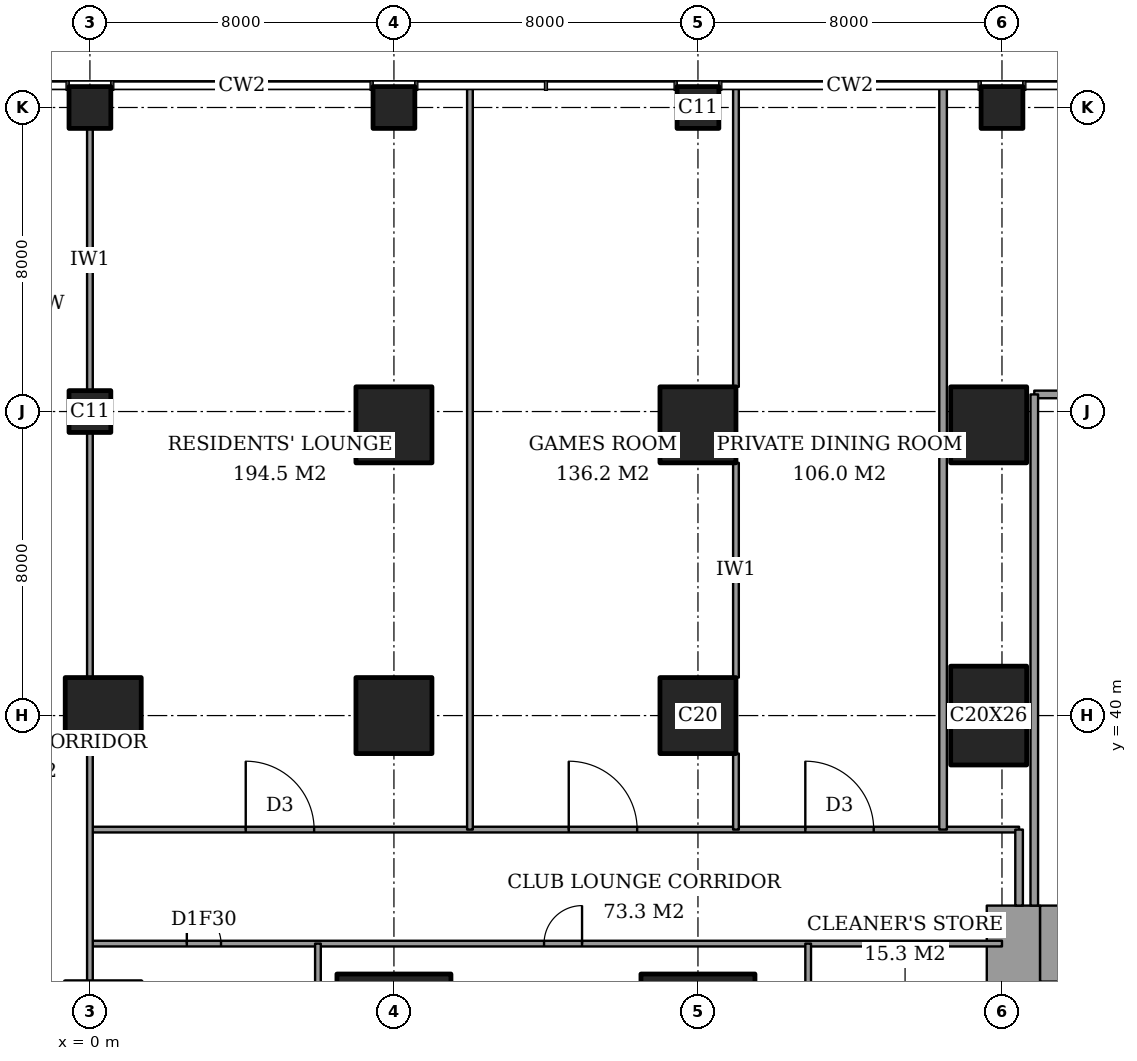
"""IFC4 building model, lengths in metres.
Left out: names, types, materials, properties, quantities, classifications, styles, units other than length and angle.
Written with IfcOpenShell. Run it as: python <this file> out.ifc"""

import sys

from ifc_helpers import new_model, si_unit, direction, frame, frame_2d, origin, origin_2d, place, context, subcontext, project, spatial, rectangle, extrude, element, fill, save


model = new_model("IFC4")
c1 = context("Model", 3, precision=1e-05, world=origin(), true_north=direction((0.0, 1.0)))
c2 = subcontext(c1, "Body", "Model", "MODEL_VIEW")
j1 = project(units=[si_unit("LENGTHUNIT", "METRE"), si_unit("PLANEANGLEUNIT", "RADIAN")], contexts=[c1])
p1 = place(None, origin())
s1 = spatial("IfcSite", under=j1, at=p1, CompositionType="ELEMENT")
p2 = place(p1, origin())
s2 = spatial("IfcBuilding", under=s1, at=p2, CompositionType="ELEMENT")
p3 = place(p2, frame((0.0, 0.0, 6.0)))
s3 = spatial("IfcBuildingStorey", under=s2, at=p3, CompositionType="ELEMENT", Elevation=6.0)
p4 = place(p3, frame((0.35, 40.0, 0.0), z_axis=(0.0, 0.0, 1.0), x_axis=(1.0, 0.0, 0.0)))
e1 = element("IfcColumn", 1, at=p4, inside=s3, PredefinedType="COLUMN", context=c2, shape_type="SweptSolid", body=[
    extrude(rectangle(XDim=2.0, YDim=2.0, at=origin_2d()), origin(), (0.0, 0.0, 1.0), 5.0),
])
for number, where, z_axis, x_axis in (
    (2, (0.0, 48.0, 0.0), (0.0, 0.0, 1.0), (1.0, 0.0, 0.0)),
    (3, (0.0, 56.0, 0.0), (0.0, 0.0, 1.0), (1.0, 0.0, 0.0)),
):
    element("IfcColumn", number, at=place(p3, frame(where, z_axis=z_axis, x_axis=x_axis)), inside=s3, PredefinedType="COLUMN", context=c2, shape_type="SweptSolid", body=[
        extrude(rectangle(XDim=1.1, YDim=1.1, at=origin_2d()), origin(), (0.0, 0.0, 1.0), 5.0),
    ])
p5 = place(p3, frame((8.0, 32.0, 0.0), z_axis=(0.0, 0.0, 1.0), x_axis=(1.0, 0.0, 0.0)))
e4 = element("IfcColumn", 4, at=p5, inside=s3, PredefinedType="COLUMN", context=c2, shape_type="SweptSolid", body=[
    extrude(rectangle(XDim=3.0, YDim=2.4, at=origin_2d()), origin(), (0.0, 0.0, 1.0), 5.0),
])
for number, where, z_axis, x_axis in (
    (5, (8.0, 40.0, 0.0), (0.0, 0.0, 1.0), (1.0, 0.0, 0.0)),
    (6, (8.0, 47.65, 0.0), (0.0, 0.0, 1.0), (1.0, 0.0, 0.0)),
):
    element("IfcColumn", number, at=place(p3, frame(where, z_axis=z_axis, x_axis=x_axis)), inside=s3, PredefinedType="COLUMN", context=c2, shape_type="SweptSolid", body=[
        extrude(rectangle(XDim=2.0, YDim=2.0, at=origin_2d()), origin(), (0.0, 0.0, 1.0), 5.0),
    ])
p6 = place(p3, frame((8.0, 56.0, 0.0), z_axis=(0.0, 0.0, 1.0), x_axis=(1.0, 0.0, 0.0)))
e7 = element("IfcColumn", 7, at=p6, inside=s3, PredefinedType="COLUMN", context=c2, shape_type="SweptSolid", body=[
    extrude(rectangle(XDim=1.1, YDim=1.1, at=origin_2d()), origin(), (0.0, 0.0, 1.0), 5.0),
])
p7 = place(p3, frame((16.0, 32.0, 0.0), z_axis=(0.0, 0.0, 1.0), x_axis=(1.0, 0.0, 0.0)))
e8 = element("IfcColumn", 8, at=p7, inside=s3, PredefinedType="COLUMN", context=c2, shape_type="SweptSolid", body=[
    extrude(rectangle(XDim=3.0, YDim=2.4, at=origin_2d()), origin(), (0.0, 0.0, 1.0), 5.0),
])
for number, where, z_axis, x_axis in (
    (9, (16.0, 40.0, 0.0), (0.0, 0.0, 1.0), (1.0, 0.0, 0.0)),
    (10, (16.0, 47.65, 0.0), (0.0, 0.0, 1.0), (1.0, 0.0, 0.0)),
):
    element("IfcColumn", number, at=place(p3, frame(where, z_axis=z_axis, x_axis=x_axis)), inside=s3, PredefinedType="COLUMN", context=c2, shape_type="SweptSolid", body=[
        extrude(rectangle(XDim=2.0, YDim=2.0, at=origin_2d()), origin(), (0.0, 0.0, 1.0), 5.0),
    ])
p8 = place(p3, frame((16.0, 56.0, 0.0), z_axis=(0.0, 0.0, 1.0), x_axis=(1.0, 0.0, 0.0)))
e11 = element("IfcColumn", 11, at=p8, inside=s3, PredefinedType="COLUMN", context=c2, shape_type="SweptSolid", body=[
    extrude(rectangle(XDim=1.1, YDim=1.1, at=origin_2d()), origin(), (0.0, 0.0, 1.0), 5.0),
])
p9 = place(p3, frame((23.65, 40.0, 0.0), z_axis=(0.0, 0.0, 1.0), x_axis=(1.0, 0.0, 0.0)))
e12 = element("IfcColumn", 12, at=p9, inside=s3, PredefinedType="COLUMN", context=c2, shape_type="SweptSolid", body=[
    extrude(rectangle(XDim=2.0, YDim=2.6, at=origin_2d()), origin(), (0.0, 0.0, 1.0), 5.0),
])
p10 = place(p3, frame((23.65, 47.65, 0.0), z_axis=(0.0, 0.0, 1.0), x_axis=(1.0, 0.0, 0.0)))
e13 = element("IfcColumn", 13, at=p10, inside=s3, PredefinedType="COLUMN", context=c2, shape_type="SweptSolid", body=[
    extrude(rectangle(XDim=2.0, YDim=2.0, at=origin_2d()), origin(), (0.0, 0.0, 1.0), 5.0),
])
p11 = place(p3, frame((24.0, 56.0, 0.0), z_axis=(0.0, 0.0, 1.0), x_axis=(1.0, 0.0, 0.0)))
e14 = element("IfcColumn", 14, at=p11, inside=s3, PredefinedType="COLUMN", context=c2, shape_type="SweptSolid", body=[
    extrude(rectangle(XDim=1.1, YDim=1.1, at=origin_2d()), origin(), (0.0, 0.0, 1.0), 5.0),
])
p12 = place(p3, frame((25.0, 34.0, 0.0), z_axis=(0.0, 0.0, 1.0), x_axis=(1.0, 0.0, 0.0)))
e15 = element("IfcWall", 15, at=p12, inside=s3, PredefinedType="SHEAR", context=c2, shape_type="SweptSolid", body=[
    extrude(rectangle(XDim=3.15, YDim=2.0, at=frame_2d((1.575, 0.0))), origin(), (0.0, 0.0, 1.0), 5.0),
])
p13 = place(p3, frame((24.3, 23.15, 0.0), z_axis=(0.0, 0.0, 1.0), x_axis=(0.0, 1.0, 0.0)))
e16 = element("IfcWall", 16, at=p13, inside=s3, PredefinedType="SHEAR", context=c2, shape_type="SweptSolid", body=[
    extrude(rectangle(XDim=11.85, YDim=1.4, at=frame_2d((5.925, 0.0))), origin(), (0.0, 0.0, 1.0), 5.0),
])
p14 = place(p13, frame((0.75, 0.0, 0.0)))
e17 = element("IfcOpeningElement", 17, at=p14, cuts=e16, PredefinedType="OPENING", context=c2, shape_type="SweptSolid", body=[
    extrude(rectangle(XDim=1.8, YDim=2.4, at=frame_2d((0.9, 1.2))), frame((0.0, 0.71, 0.0), z_axis=(0.0, -1.0, 0.0), x_axis=(1.0, 0.0, 0.0)), (0.0, 0.0, 1.0), 1.42),
])
p15 = place(p3, frame((0.0, 34.0, 0.0), z_axis=(0.0, 0.0, 1.0), x_axis=(1.0, 0.0, 0.0)))
e18 = element("IfcWall", 18, at=p15, inside=s3, PredefinedType="PARTITIONING", context=c2, shape_type="SweptSolid", body=[
    extrude(rectangle(XDim=24.0, YDim=0.15, at=frame_2d((12.0, 0.0))), origin(), (0.0, 0.0, 1.0), 4.7),
])
p16 = place(p15, frame((11.95, 0.0, 0.0)))
e19 = element("IfcOpeningElement", 19, at=p16, cuts=e18, PredefinedType="OPENING", context=c2, shape_type="SweptSolid", body=[
    extrude(rectangle(XDim=1.0, YDim=2.1, at=frame_2d((0.5, 1.05))), frame((0.0, 0.085, 0.0), z_axis=(0.0, -1.0, 0.0), x_axis=(1.0, 0.0, 0.0)), (0.0, 0.0, 1.0), 0.17),
])
p17 = place(p15, frame((2.55, 0.0, 0.0)))
e20 = element("IfcOpeningElement", 20, at=p17, cuts=e18, PredefinedType="OPENING", context=c2, shape_type="SweptSolid", body=[
    extrude(rectangle(XDim=0.9, YDim=2.1, at=frame_2d((0.45, 1.05))), frame((0.0, 0.085, 0.0), z_axis=(0.0, -1.0, 0.0), x_axis=(1.0, 0.0, 0.0)), (0.0, 0.0, 1.0), 0.17),
])
p18 = place(p3, frame((0.0, 37.0, 0.0), z_axis=(0.0, 0.0, 1.0), x_axis=(1.0, 0.0, 0.0)))
e21 = element("IfcWall", 21, at=p18, inside=s3, PredefinedType="PARTITIONING", context=c2, shape_type="SweptSolid", body=[
    extrude(rectangle(XDim=24.45, YDim=0.15, at=frame_2d((12.225, 0.0))), origin(), (0.0, 0.0, 1.0), 4.7),
])
p19 = place(p18, frame((4.1, 0.0, 0.0)))
e22 = element("IfcOpeningElement", 22, at=p19, cuts=e21, PredefinedType="OPENING", context=c2, shape_type="SweptSolid", body=[
    extrude(rectangle(XDim=1.8, YDim=2.1, at=frame_2d((0.9, 1.05))), frame((0.0, 0.085, 0.0), z_axis=(0.0, -1.0, 0.0), x_axis=(1.0, 0.0, 0.0)), (0.0, 0.0, 1.0), 0.17),
])
p20 = place(p18, frame((12.6, 0.0, 0.0)))
e23 = element("IfcOpeningElement", 23, at=p20, cuts=e21, PredefinedType="OPENING", context=c2, shape_type="SweptSolid", body=[
    extrude(rectangle(XDim=1.8, YDim=2.1, at=frame_2d((0.9, 1.05))), frame((0.0, 0.085, 0.0), z_axis=(0.0, -1.0, 0.0), x_axis=(1.0, 0.0, 0.0)), (0.0, 0.0, 1.0), 0.17),
])
p21 = place(p18, frame((18.825, 0.0, 0.0)))
e24 = element("IfcOpeningElement", 24, at=p21, cuts=e21, PredefinedType="OPENING", context=c2, shape_type="SweptSolid", body=[
    extrude(rectangle(XDim=1.8, YDim=2.1, at=frame_2d((0.9, 1.05))), frame((0.0, 0.085, 0.0), z_axis=(0.0, -1.0, 0.0), x_axis=(1.0, 0.0, 0.0)), (0.0, 0.0, 1.0), 0.17),
])
p22 = place(p3, frame((24.85, 48.45, 0.0), z_axis=(0.0, 0.0, 1.0), x_axis=(1.0, 0.0, 0.0)))
e25 = element("IfcWall", 25, at=p22, inside=s3, PredefinedType="PARTITIONING", context=c2, shape_type="SweptSolid", body=[
    extrude(rectangle(XDim=7.6, YDim=0.2, at=frame_2d((3.8, 0.0))), origin(), (0.0, 0.0, 1.0), 4.7),
])
p23 = place(p3, frame((0.0, 33.0, 0.0), z_axis=(0.0, 0.0, 1.0), x_axis=(0.0, 1.0, 0.0)))
e26 = element("IfcWall", 26, at=p23, inside=s3, PredefinedType="PARTITIONING", context=c2, shape_type="SweptSolid", body=[
    extrude(rectangle(XDim=6.0, YDim=0.15, at=frame_2d((3.0, 0.0))), origin(), (0.0, 0.0, 1.0), 3.3),
])
p24 = place(p3, frame((0.0, 41.0, 0.0), z_axis=(0.0, 0.0, 1.0), x_axis=(0.0, 1.0, 0.0)))
e27 = element("IfcWall", 27, at=p24, inside=s3, PredefinedType="PARTITIONING", context=c2, shape_type="SweptSolid", body=[
    extrude(rectangle(XDim=6.45, YDim=0.15, at=frame_2d((3.225, 0.0))), origin(), (0.0, 0.0, 1.0), 3.3),
])
p25 = place(p3, frame((0.0, 48.55, 0.0), z_axis=(0.0, 0.0, 1.0), x_axis=(0.0, 1.0, 0.0)))
e28 = element("IfcWall", 28, at=p25, inside=s3, PredefinedType="PARTITIONING", context=c2, shape_type="SweptSolid", body=[
    extrude(rectangle(XDim=6.9, YDim=0.15, at=frame_2d((3.45, 0.0))), origin(), (0.0, 0.0, 1.0), 3.3),
])
p26 = place(p3, frame((6.0, 30.0, 0.0), z_axis=(0.0, 0.0, 1.0), x_axis=(0.0, 1.0, 0.0)))
e29 = element("IfcWall", 29, at=p26, inside=s3, PredefinedType="PARTITIONING", context=c2, shape_type="SweptSolid", body=[
    extrude(rectangle(XDim=4.0, YDim=0.15, at=frame_2d((2.0, 0.0))), origin(), (0.0, 0.0, 1.0), 4.7),
])
p27 = place(p3, frame((10.0, 37.0, 0.0), z_axis=(0.0, 0.0, 1.0), x_axis=(0.0, 1.0, 0.0)))
e30 = element("IfcWall", 30, at=p27, inside=s3, PredefinedType="PARTITIONING", context=c2, shape_type="SweptSolid", body=[
    extrude(rectangle(XDim=19.561, YDim=0.15, at=frame_2d((9.781, 0.0))), origin(), (0.0, 0.0, 1.0), 4.7),
])
p28 = place(p3, frame((17.0, 37.0, 0.0), z_axis=(0.0, 0.0, 1.0), x_axis=(0.0, 1.0, 0.0)))
e31 = element("IfcWall", 31, at=p28, inside=s3, PredefinedType="PARTITIONING", context=c2, shape_type="SweptSolid", body=[
    extrude(rectangle(XDim=2.0, YDim=0.15, at=frame_2d((1.0, 0.0))), origin(), (0.0, 0.0, 1.0), 4.7),
])
p29 = place(p3, frame((17.0, 41.0, 0.0), z_axis=(0.0, 0.0, 1.0), x_axis=(0.0, 1.0, 0.0)))
e32 = element("IfcWall", 32, at=p29, inside=s3, PredefinedType="PARTITIONING", context=c2, shape_type="SweptSolid", body=[
    extrude(rectangle(XDim=5.65, YDim=0.15, at=frame_2d((2.825, 0.0))), origin(), (0.0, 0.0, 1.0), 4.7),
])
p30 = place(p3, frame((17.0, 48.65, 0.0), z_axis=(0.0, 0.0, 1.0), x_axis=(0.0, 1.0, 0.0)))
e33 = element("IfcWall", 33, at=p30, inside=s3, PredefinedType="PARTITIONING", context=c2, shape_type="SweptSolid", body=[
    extrude(rectangle(XDim=7.911, YDim=0.15, at=frame_2d((3.956, 0.0))), origin(), (0.0, 0.0, 1.0), 4.7),
])
p31 = place(p3, frame((18.9, 31.0, 0.0), z_axis=(0.0, 0.0, 1.0), x_axis=(0.0, 1.0, 0.0)))
e34 = element("IfcWall", 34, at=p31, inside=s3, PredefinedType="PARTITIONING", context=c2, shape_type="SweptSolid", body=[
    extrude(rectangle(XDim=3.0, YDim=0.15, at=frame_2d((1.5, 0.0))), origin(), (0.0, 0.0, 1.0), 4.7),
])
p32 = place(p31, frame((1.05, 0.0, 0.0)))
e35 = element("IfcOpeningElement", 35, at=p32, cuts=e34, PredefinedType="OPENING", context=c2, shape_type="SweptSolid", body=[
    extrude(rectangle(XDim=0.9, YDim=2.1, at=frame_2d((0.45, 1.05))), frame((0.0, 0.085, 0.0), z_axis=(0.0, -1.0, 0.0), x_axis=(1.0, 0.0, 0.0)), (0.0, 0.0, 1.0), 0.17),
])
p33 = place(p3, frame((22.45, 37.0, 0.0), z_axis=(0.0, 0.0, 1.0), x_axis=(0.0, 1.0, 0.0)))
e36 = element("IfcWall", 36, at=p33, inside=s3, PredefinedType="PARTITIONING", context=c2, shape_type="SweptSolid", body=[
    extrude(rectangle(XDim=19.561, YDim=0.2, at=frame_2d((9.781, 0.0))), origin(), (0.0, 0.0, 1.0), 4.7),
])
p34 = place(p3, frame((24.45, 35.0, 0.0), z_axis=(0.0, 0.0, 1.0), x_axis=(0.0, 1.0, 0.0)))
e37 = element("IfcWall", 37, at=p34, inside=s3, PredefinedType="PARTITIONING", context=c2, shape_type="SweptSolid", body=[
    extrude(rectangle(XDim=2.0, YDim=0.2, at=frame_2d((1.0, 0.0))), origin(), (0.0, 0.0, 1.0), 4.7),
])
p35 = place(p3, frame((24.85, 35.0, 0.0), z_axis=(0.0, 0.0, 1.0), x_axis=(0.0, 1.0, 0.0)))
e38 = element("IfcWall", 38, at=p35, inside=s3, PredefinedType="PARTITIONING", context=c2, shape_type="SweptSolid", body=[
    extrude(rectangle(XDim=13.45, YDim=0.2, at=frame_2d((6.725, 0.0))), origin(), (0.0, 0.0, 1.0), 4.7),
])
p36 = place(p16, origin())
e39 = element("IfcDoor", 39, at=p36, inside=s3, OperationType="SINGLE_SWING_LEFT", PredefinedType="DOOR", context=c2, shape_type="SweptSolid", body=[
    extrude(rectangle(XDim=1.0, YDim=2.1, at=frame_2d((0.5, 1.05))), frame((0.0, 0.025, 0.0), z_axis=(0.0, -1.0, 0.0), x_axis=(1.0, 0.0, 0.0)), (0.0, 0.0, 1.0), 0.05),
])
fill(e19, e39)
p37 = place(p17, origin())
e40 = element("IfcDoor", 40, at=p37, inside=s3, OperationType="SINGLE_SWING_RIGHT", PredefinedType="DOOR", context=c2, shape_type="SweptSolid", body=[
    extrude(rectangle(XDim=0.9, YDim=2.1, at=frame_2d((0.45, 1.05))), frame((0.0, 0.025, 0.0), z_axis=(0.0, -1.0, 0.0), x_axis=(1.0, 0.0, 0.0)), (0.0, 0.0, 1.0), 0.05),
])
fill(e20, e40)
p38 = place(p19, origin())
e41 = element("IfcDoor", 41, at=p38, inside=s3, OperationType="DOUBLE_DOOR_DOUBLE_SWING", PredefinedType="DOOR", context=c2, shape_type="SweptSolid", body=[
    extrude(rectangle(XDim=1.8, YDim=2.1, at=frame_2d((0.9, 1.05))), frame((0.0, 0.025, 0.0), z_axis=(0.0, -1.0, 0.0), x_axis=(1.0, 0.0, 0.0)), (0.0, 0.0, 1.0), 0.05),
])
fill(e22, e41)
p39 = place(p20, origin())
e42 = element("IfcDoor", 42, at=p39, inside=s3, OperationType="DOUBLE_DOOR_DOUBLE_SWING", PredefinedType="DOOR", context=c2, shape_type="SweptSolid", body=[
    extrude(rectangle(XDim=1.8, YDim=2.1, at=frame_2d((0.9, 1.05))), frame((0.0, 0.025, 0.0), z_axis=(0.0, -1.0, 0.0), x_axis=(1.0, 0.0, 0.0)), (0.0, 0.0, 1.0), 0.05),
])
fill(e23, e42)
p40 = place(p21, origin())
e43 = element("IfcDoor", 43, at=p40, inside=s3, OperationType="DOUBLE_DOOR_DOUBLE_SWING", PredefinedType="DOOR", context=c2, shape_type="SweptSolid", body=[
    extrude(rectangle(XDim=1.8, YDim=2.1, at=frame_2d((0.9, 1.05))), frame((0.0, 0.025, 0.0), z_axis=(0.0, -1.0, 0.0), x_axis=(1.0, 0.0, 0.0)), (0.0, 0.0, 1.0), 0.05),
])
fill(e24, e43)
save(model, sys.argv[1])
